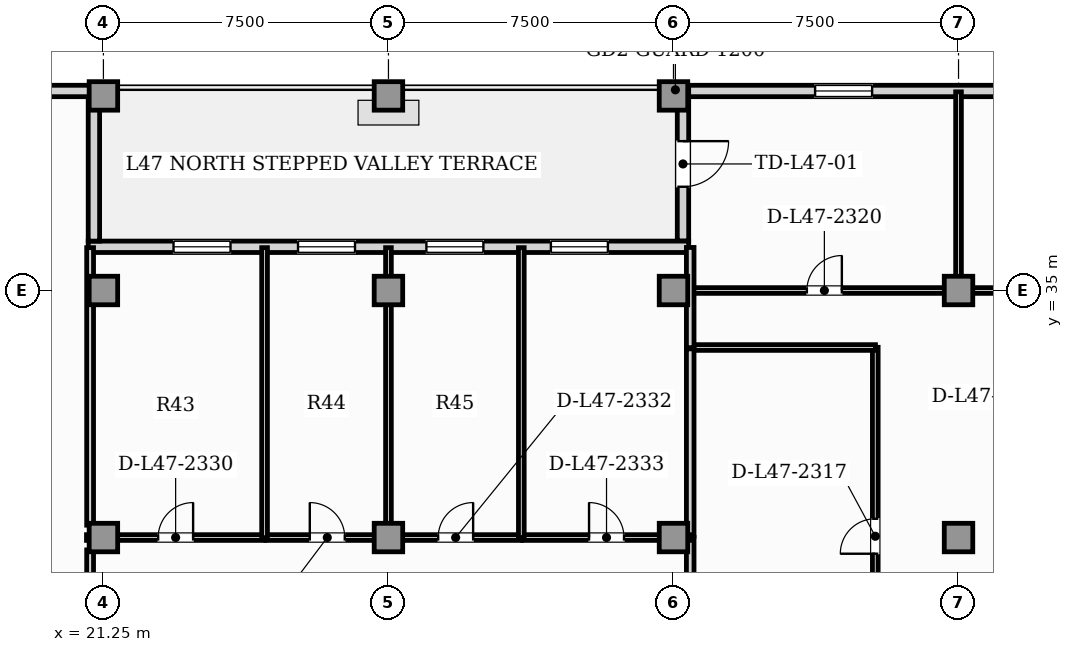
"""IFC4 building model, lengths in metres.
Left out: names, types, materials, properties, quantities, classifications, styles, units other than length and angle.
Written with IfcOpenShell. Run it as: python <this file> out.ifc"""

import sys

from ifc_helpers import new_model, si_unit, direction, frame, frame_2d, origin, origin_2d, place, context, subcontext, project, spatial, rectangle, extrude, element, fill, save


model = new_model("IFC4")
c1 = context("Model", 3, precision=1e-05, world=origin(), true_north=direction((0.0, 1.0)))
c2 = subcontext(c1, "Body", "Model", "MODEL_VIEW")
j1 = project(units=[si_unit("LENGTHUNIT", "METRE"), si_unit("PLANEANGLEUNIT", "RADIAN")], contexts=[c1])
p1 = place(None, origin())
s1 = spatial("IfcSite", under=j1, at=p1, CompositionType="ELEMENT")
p2 = place(p1, origin())
s2 = spatial("IfcBuilding", under=s1, at=p2, CompositionType="ELEMENT")
p3 = place(p2, frame((0.0, 0.0, 192.6)))
s3 = spatial("IfcBuildingStorey", under=s2, at=p3, CompositionType="ELEMENT", Elevation=192.6)
for number, where, z_axis, x_axis in (
    (1, (21.25, 28.5, 0.0), (0.0, 0.0, 1.0), (1.0, 0.0, 0.0)),
    (2, (28.75, 28.5, 0.0), (0.0, 0.0, 1.0), (1.0, 0.0, 0.0)),
    (3, (36.25, 28.5, 0.0), (0.0, 0.0, 1.0), (1.0, 0.0, 0.0)),
    (4, (43.75, 28.5, 0.0), (0.0, 0.0, 1.0), (1.0, 0.0, 0.0)),
    (5, (21.25, 40.12, 0.0), (0.0, 0.0, 1.0), (1.0, 0.0, 0.0)),
    (6, (28.75, 40.12, 0.0), (0.0, 0.0, 1.0), (1.0, 0.0, 0.0)),
    (7, (36.25, 40.12, 0.0), (0.0, 0.0, 1.0), (1.0, 0.0, 0.0)),
    (8, (21.25, 35.0, 0.0), (0.0, 0.0, 1.0), (1.0, 0.0, 0.0)),
    (9, (28.75, 35.0, 0.0), (0.0, 0.0, 1.0), (1.0, 0.0, 0.0)),
    (10, (36.25, 35.0, 0.0), (0.0, 0.0, 1.0), (1.0, 0.0, 0.0)),
    (11, (43.75, 35.0, 0.0), (0.0, 0.0, 1.0), (1.0, 0.0, 0.0)),
):
    element("IfcColumn", number, at=place(p3, frame(where, z_axis=z_axis, x_axis=x_axis)), inside=s3, PredefinedType="COLUMN", context=c2, shape_type="SweptSolid", body=[
        extrude(rectangle(XDim=0.75, YDim=0.75, at=origin_2d()), origin(), (0.0, 0.0, 1.0), 3.85),
    ])
p4 = place(p3, frame((49.06, 40.25, 0.0), z_axis=(0.0, 0.0, 1.0), x_axis=(-1.0, 0.0, 0.0)))
e12 = element("IfcWall", 12, at=p4, inside=s3, PredefinedType="SOLIDWALL", context=c2, shape_type="SweptSolid", body=[
    extrude(rectangle(XDim=12.67, YDim=0.3, at=frame_2d((6.335, 0.0))), origin(), (0.0, 0.0, 1.0), 3.63),
])
p5 = place(p4, frame((7.584, 0.0, 0.9)))
e13 = element("IfcOpeningElement", 13, at=p5, cuts=e12, PredefinedType="OPENING", context=c2, shape_type="SweptSolid", body=[
    extrude(rectangle(XDim=1.5, YDim=1.95, at=frame_2d((0.75, 0.975))), frame((0.0, 0.16, 0.0), z_axis=(0.0, -1.0, 0.0), x_axis=(1.0, 0.0, 0.0)), (0.0, 0.0, 1.0), 0.32),
])
p6 = place(p3, frame((36.5, 40.36, 0.0), z_axis=(0.0, 0.0, 1.0), x_axis=(0.0, -1.0, 0.0)))
e14 = element("IfcWall", 14, at=p6, inside=s3, PredefinedType="SOLIDWALL", context=c2, shape_type="SweptSolid", body=[
    extrude(rectangle(XDim=4.06, YDim=0.3, at=frame_2d((2.03, 0.0))), origin(), (0.0, 0.0, 1.0), 3.63),
])
p7 = place(p6, frame((1.43, 0.0, 0.0)))
e15 = element("IfcOpeningElement", 15, at=p7, cuts=e14, PredefinedType="OPENING", context=c2, shape_type="SweptSolid", body=[
    extrude(rectangle(XDim=1.2, YDim=2.2, at=frame_2d((0.6, 1.1))), frame((0.0, 0.16, 0.0), z_axis=(0.0, -1.0, 0.0), x_axis=(1.0, 0.0, 0.0)), (0.0, 0.0, 1.0), 0.32),
])
p8 = place(p3, frame((36.65, 36.15, 0.0), z_axis=(0.0, 0.0, 1.0), x_axis=(-1.0, 0.0, 0.0)))
e16 = element("IfcWall", 16, at=p8, inside=s3, PredefinedType="SOLIDWALL", context=c2, shape_type="SweptSolid", body=[
    extrude(rectangle(XDim=15.8, YDim=0.3, at=frame_2d((7.9, 0.0))), origin(), (0.0, 0.0, 1.0), 3.63),
])
p9 = place(p8, frame((12.055, 0.0, 0.9)))
e17 = element("IfcOpeningElement", 17, at=p9, cuts=e16, PredefinedType="OPENING", context=c2, shape_type="SweptSolid", body=[
    extrude(rectangle(XDim=1.5, YDim=1.95, at=frame_2d((0.75, 0.975))), frame((0.0, 0.16, 0.0), z_axis=(0.0, -1.0, 0.0), x_axis=(1.0, 0.0, 0.0)), (0.0, 0.0, 1.0), 0.32),
])
p10 = place(p8, frame((8.78, 0.0, 0.9)))
e18 = element("IfcOpeningElement", 18, at=p10, cuts=e16, PredefinedType="OPENING", context=c2, shape_type="SweptSolid", body=[
    extrude(rectangle(XDim=1.5, YDim=1.95, at=frame_2d((0.75, 0.975))), frame((0.0, 0.16, 0.0), z_axis=(0.0, -1.0, 0.0), x_axis=(1.0, 0.0, 0.0)), (0.0, 0.0, 1.0), 0.32),
])
p11 = place(p8, frame((5.402, 0.0, 0.9)))
e19 = element("IfcOpeningElement", 19, at=p11, cuts=e16, PredefinedType="OPENING", context=c2, shape_type="SweptSolid", body=[
    extrude(rectangle(XDim=1.5, YDim=1.95, at=frame_2d((0.75, 0.975))), frame((0.0, 0.16, 0.0), z_axis=(0.0, -1.0, 0.0), x_axis=(1.0, 0.0, 0.0)), (0.0, 0.0, 1.0), 0.32),
])
p12 = place(p8, frame((2.126, 0.0, 0.9)))
e20 = element("IfcOpeningElement", 20, at=p12, cuts=e16, PredefinedType="OPENING", context=c2, shape_type="SweptSolid", body=[
    extrude(rectangle(XDim=1.5, YDim=1.95, at=frame_2d((0.75, 0.975))), frame((0.0, 0.16, 0.0), z_axis=(0.0, -1.0, 0.0), x_axis=(1.0, 0.0, 0.0)), (0.0, 0.0, 1.0), 0.32),
])
p13 = place(p3, frame((21.0, 36.3, 0.0), z_axis=(0.0, 0.0, 1.0), x_axis=(0.0, 1.0, 0.0)))
e21 = element("IfcWall", 21, at=p13, inside=s3, PredefinedType="SOLIDWALL", context=c2, shape_type="SweptSolid", body=[
    extrude(rectangle(XDim=4.06, YDim=0.3, at=frame_2d((2.03, 0.0))), origin(), (0.0, 0.0, 1.0), 3.63),
])
p14 = place(p3, frame((21.11, 40.25, 0.0), z_axis=(0.0, 0.0, 1.0), x_axis=(-1.0, 0.0, 0.0)))
e22 = element("IfcWall", 22, at=p14, inside=s3, PredefinedType="SOLIDWALL", context=c2, shape_type="SweptSolid", body=[
    extrude(rectangle(XDim=12.67, YDim=0.3, at=frame_2d((6.335, 0.0))), origin(), (0.0, 0.0, 1.0), 3.63),
])
p15 = place(p14, frame((10.4, 0.0, 0.9)))
e23 = element("IfcOpeningElement", 23, at=p15, cuts=e22, PredefinedType="OPENING", context=c2, shape_type="SweptSolid", body=[
    extrude(rectangle(XDim=1.5, YDim=1.95, at=frame_2d((0.75, 0.975))), frame((0.0, 0.16, 0.0), z_axis=(0.0, -1.0, 0.0), x_axis=(1.0, 0.0, 0.0)), (0.0, 0.0, 1.0), 0.32),
])
p16 = place(p14, frame((7.186, 0.0, 0.9)))
e24 = element("IfcOpeningElement", 24, at=p16, cuts=e22, PredefinedType="OPENING", context=c2, shape_type="SweptSolid", body=[
    extrude(rectangle(XDim=1.5, YDim=1.95, at=frame_2d((0.75, 0.975))), frame((0.0, 0.16, 0.0), z_axis=(0.0, -1.0, 0.0), x_axis=(1.0, 0.0, 0.0)), (0.0, 0.0, 1.0), 0.32),
])
p17 = place(p3, frame((41.56, 23.563, 0.0), z_axis=(0.0, 0.0, 1.0), x_axis=(0.0, 1.0, 0.0)))
e25 = element("IfcWall", 25, at=p17, inside=s3, PredefinedType="PARTITIONING", context=c2, shape_type="SweptSolid", body=[
    extrude(rectangle(XDim=9.942, YDim=0.15, at=frame_2d((4.971, 0.0))), origin(), (0.0, 0.0, 1.0), 3.63),
])
p18 = place(p17, frame((4.511, 0.0, 0.0)))
e26 = element("IfcOpeningElement", 26, at=p18, cuts=e25, PredefinedType="OPENING", context=c2, shape_type="SweptSolid", body=[
    extrude(rectangle(XDim=0.92, YDim=2.1, at=frame_2d((0.46, 1.05))), frame((0.0, 0.085, 0.0), z_axis=(0.0, -1.0, 0.0), x_axis=(1.0, 0.0, 0.0)), (0.0, 0.0, 1.0), 0.17),
])
p19 = place(p3, frame((36.685, 33.5, 0.0), z_axis=(0.0, 0.0, 1.0), x_axis=(1.0, 0.0, 0.0)))
e27 = element("IfcWall", 27, at=p19, inside=s3, PredefinedType="PARTITIONING", context=c2, shape_type="SweptSolid", body=[
    extrude(rectangle(XDim=4.88, YDim=0.15, at=frame_2d((2.44, 0.0))), origin(), (0.0, 0.0, 1.0), 3.63),
])
p20 = place(p3, frame((36.685, 35.0, 0.0), z_axis=(0.0, 0.0, 1.0), x_axis=(1.0, 0.0, 0.0)))
e28 = element("IfcWall", 28, at=p20, inside=s3, PredefinedType="PARTITIONING", context=c2, shape_type="SweptSolid", body=[
    extrude(rectangle(XDim=7.07, YDim=0.15, at=frame_2d((3.535, 0.0))), origin(), (0.0, 0.0, 1.0), 3.085),
])
p21 = place(p20, frame((3.075, 0.0, 0.0)))
e29 = element("IfcOpeningElement", 29, at=p21, cuts=e28, PredefinedType="OPENING", context=c2, shape_type="SweptSolid", body=[
    extrude(rectangle(XDim=0.92, YDim=2.1, at=frame_2d((0.46, 1.05))), frame((0.0, 0.085, 0.0), z_axis=(0.0, -1.0, 0.0), x_axis=(1.0, 0.0, 0.0)), (0.0, 0.0, 1.0), 0.17),
])
p22 = place(p3, frame((43.785, 35.0, 0.0), z_axis=(0.0, 0.0, 1.0), x_axis=(1.0, 0.0, 0.0)))
e30 = element("IfcWall", 30, at=p22, inside=s3, PredefinedType="PARTITIONING", context=c2, shape_type="SweptSolid", body=[
    extrude(rectangle(XDim=8.343, YDim=0.15, at=frame_2d((4.171, 0.0))), origin(), (0.0, 0.0, 1.0), 3.085),
])
p23 = place(p22, frame((3.711, 0.0, 0.0)))
e31 = element("IfcOpeningElement", 31, at=p23, cuts=e30, PredefinedType="OPENING", context=c2, shape_type="SweptSolid", body=[
    extrude(rectangle(XDim=0.92, YDim=2.1, at=frame_2d((0.46, 1.05))), frame((0.0, 0.085, 0.0), z_axis=(0.0, -1.0, 0.0), x_axis=(1.0, 0.0, 0.0)), (0.0, 0.0, 1.0), 0.17),
])
p24 = place(p3, frame((36.69, 33.495, 0.0), z_axis=(0.0, 0.0, 1.0), x_axis=(0.0, 1.0, 0.0)))
e32 = element("IfcWall", 32, at=p24, inside=s3, PredefinedType="PARTITIONING", context=c2, shape_type="SweptSolid", body=[
    extrude(rectangle(XDim=2.638, YDim=0.2, at=frame_2d((1.319, 0.0))), origin(), (0.0, 0.0, 1.0), 3.63),
])
p25 = place(p3, frame((36.69, 26.995, 0.0), z_axis=(0.0, 0.0, 1.0), x_axis=(0.0, 1.0, 0.0)))
e33 = element("IfcWall", 33, at=p25, inside=s3, PredefinedType="PARTITIONING", context=c2, shape_type="SweptSolid", body=[
    extrude(rectangle(XDim=1.51, YDim=0.2, at=frame_2d((0.755, 0.0))), origin(), (0.0, 0.0, 1.0), 3.63),
])
p26 = place(p3, frame((36.69, 28.535, 0.0), z_axis=(0.0, 0.0, 1.0), x_axis=(0.0, 1.0, 0.0)))
e34 = element("IfcWall", 34, at=p26, inside=s3, PredefinedType="PARTITIONING", context=c2, shape_type="SweptSolid", body=[
    extrude(rectangle(XDim=4.93, YDim=0.2, at=frame_2d((2.465, 0.0))), origin(), (0.0, 0.0, 1.0), 3.63),
])
p27 = place(p3, frame((43.75, 34.995, 0.0), z_axis=(0.0, 0.0, 1.0), x_axis=(0.0, 1.0, 0.0)))
e35 = element("IfcWall", 35, at=p27, inside=s3, PredefinedType="PARTITIONING", context=c2, shape_type="SweptSolid", body=[
    extrude(rectangle(XDim=5.232, YDim=0.15, at=frame_2d((2.616, 0.0))), origin(), (0.0, 0.0, 1.0), 3.63),
])
p28 = place(p3, frame((20.805, 28.5, 0.0), z_axis=(0.0, 0.0, 1.0), x_axis=(1.0, 0.0, 0.0)))
e36 = element("IfcWall", 36, at=p28, inside=s3, PredefinedType="PARTITIONING", context=c2, shape_type="SweptSolid", body=[
    extrude(rectangle(XDim=4.691, YDim=0.15, at=frame_2d((2.345, 0.0))), origin(), (0.0, 0.0, 1.0), 3.63),
])
p29 = place(p28, frame((1.885, 0.0, 0.0)))
e37 = element("IfcOpeningElement", 37, at=p29, cuts=e36, PredefinedType="OPENING", context=c2, shape_type="SweptSolid", body=[
    extrude(rectangle(XDim=0.92, YDim=2.1, at=frame_2d((0.46, 1.05))), frame((0.0, 0.085, 0.0), z_axis=(0.0, -1.0, 0.0), x_axis=(1.0, 0.0, 0.0)), (0.0, 0.0, 1.0), 0.17),
])
p30 = place(p3, frame((25.526, 28.5, 0.0), z_axis=(0.0, 0.0, 1.0), x_axis=(1.0, 0.0, 0.0)))
e38 = element("IfcWall", 38, at=p30, inside=s3, PredefinedType="PARTITIONING", context=c2, shape_type="SweptSolid", body=[
    extrude(rectangle(XDim=3.229, YDim=0.15, at=frame_2d((1.615, 0.0))), origin(), (0.0, 0.0, 1.0), 3.63),
])
p31 = place(p30, frame((1.155, 0.0, 0.0)))
e39 = element("IfcOpeningElement", 39, at=p31, cuts=e38, PredefinedType="OPENING", context=c2, shape_type="SweptSolid", body=[
    extrude(rectangle(XDim=0.92, YDim=2.1, at=frame_2d((0.46, 1.05))), frame((0.0, 0.085, 0.0), z_axis=(0.0, -1.0, 0.0), x_axis=(1.0, 0.0, 0.0)), (0.0, 0.0, 1.0), 0.17),
])
p32 = place(p3, frame((28.785, 28.5, 0.0), z_axis=(0.0, 0.0, 1.0), x_axis=(1.0, 0.0, 0.0)))
e40 = element("IfcWall", 40, at=p32, inside=s3, PredefinedType="PARTITIONING", context=c2, shape_type="SweptSolid", body=[
    extrude(rectangle(XDim=3.466, YDim=0.15, at=frame_2d((1.733, 0.0))), origin(), (0.0, 0.0, 1.0), 3.63),
])
p33 = place(p32, frame((1.273, 0.0, 0.0)))
e41 = element("IfcOpeningElement", 41, at=p33, cuts=e40, PredefinedType="OPENING", context=c2, shape_type="SweptSolid", body=[
    extrude(rectangle(XDim=0.92, YDim=2.1, at=frame_2d((0.46, 1.05))), frame((0.0, 0.085, 0.0), z_axis=(0.0, -1.0, 0.0), x_axis=(1.0, 0.0, 0.0)), (0.0, 0.0, 1.0), 0.17),
])
p34 = place(p3, frame((32.281, 28.5, 0.0), z_axis=(0.0, 0.0, 1.0), x_axis=(1.0, 0.0, 0.0)))
e42 = element("IfcWall", 42, at=p34, inside=s3, PredefinedType="PARTITIONING", context=c2, shape_type="SweptSolid", body=[
    extrude(rectangle(XDim=4.414, YDim=0.15, at=frame_2d((2.207, 0.0))), origin(), (0.0, 0.0, 1.0), 3.63),
])
p35 = place(p34, frame((1.747, 0.0, 0.0)))
e43 = element("IfcOpeningElement", 43, at=p35, cuts=e42, PredefinedType="OPENING", context=c2, shape_type="SweptSolid", body=[
    extrude(rectangle(XDim=0.92, YDim=2.1, at=frame_2d((0.46, 1.05))), frame((0.0, 0.085, 0.0), z_axis=(0.0, -1.0, 0.0), x_axis=(1.0, 0.0, 0.0)), (0.0, 0.0, 1.0), 0.17),
])
p36 = place(p3, frame((25.49, 28.495, 0.0), z_axis=(0.0, 0.0, 1.0), x_axis=(0.0, 1.0, 0.0)))
e44 = element("IfcWall", 44, at=p36, inside=s3, PredefinedType="PARTITIONING", context=c2, shape_type="SweptSolid", body=[
    extrude(rectangle(XDim=7.632, YDim=0.15, at=frame_2d((3.816, 0.0))), origin(), (0.0, 0.0, 1.0), 3.63),
])
p37 = place(p3, frame((28.75, 28.495, 0.0), z_axis=(0.0, 0.0, 1.0), x_axis=(0.0, 1.0, 0.0)))
e45 = element("IfcWall", 45, at=p37, inside=s3, PredefinedType="PARTITIONING", context=c2, shape_type="SweptSolid", body=[
    extrude(rectangle(XDim=7.632, YDim=0.15, at=frame_2d((3.816, 0.0))), origin(), (0.0, 0.0, 1.0), 3.223),
])
p38 = place(p3, frame((32.246, 28.495, 0.0), z_axis=(0.0, 0.0, 1.0), x_axis=(0.0, 1.0, 0.0)))
e46 = element("IfcWall", 46, at=p38, inside=s3, PredefinedType="PARTITIONING", context=c2, shape_type="SweptSolid", body=[
    extrude(rectangle(XDim=7.632, YDim=0.15, at=frame_2d((3.816, 0.0))), origin(), (0.0, 0.0, 1.0), 3.63),
])
p39 = place(p3, frame((20.9, 27.325, 0.0), z_axis=(0.0, 0.0, 1.0), x_axis=(0.0, 1.0, 0.0)))
e47 = element("IfcWall", 47, at=p39, inside=s3, PredefinedType="PARTITIONING", context=c2, shape_type="SweptSolid", body=[
    extrude(rectangle(XDim=0.85, YDim=0.18, at=frame_2d((0.425, 0.0))), origin(), (0.0, 0.0, 1.0), 3.63),
])
p40 = place(p3, frame((20.9, 28.825, 0.0), z_axis=(0.0, 0.0, 1.0), x_axis=(0.0, 1.0, 0.0)))
e48 = element("IfcWall", 48, at=p40, inside=s3, PredefinedType="PARTITIONING", context=c2, shape_type="SweptSolid", body=[
    extrude(rectangle(XDim=7.302, YDim=0.18, at=frame_2d((3.651, 0.0))), origin(), (0.0, 0.0, 1.0), 3.63),
])
p41 = place(p7, frame((1.2, 0.0, 0.0), z_axis=(0.0, 0.0, 1.0), x_axis=(-1.0, 0.0, 0.0)))
e49 = element("IfcDoor", 49, at=p41, inside=s3, OperationType="SINGLE_SWING_RIGHT", PredefinedType="DOOR", context=c2, shape_type="SweptSolid", body=[
    extrude(rectangle(XDim=1.2, YDim=2.2, at=frame_2d((0.6, 1.1))), frame((0.0, 0.025, 0.0), z_axis=(0.0, -1.0, 0.0), x_axis=(1.0, 0.0, 0.0)), (0.0, 0.0, 1.0), 0.05),
])
fill(e15, e49)
p42 = place(p5, origin())
e50 = element("IfcWindow", 50, at=p42, inside=s3, PartitioningType="SINGLE_PANEL", PredefinedType="WINDOW", context=c2, shape_type="SweptSolid", body=[
    extrude(rectangle(XDim=1.5, YDim=1.95, at=frame_2d((0.75, 0.975))), frame((0.0, 0.03, 0.0), z_axis=(0.0, -1.0, 0.0), x_axis=(1.0, 0.0, 0.0)), (0.0, 0.0, 1.0), 0.06),
])
fill(e13, e50)
p43 = place(p9, origin())
e51 = element("IfcWindow", 51, at=p43, inside=s3, PartitioningType="SINGLE_PANEL", PredefinedType="WINDOW", context=c2, shape_type="SweptSolid", body=[
    extrude(rectangle(XDim=1.5, YDim=1.95, at=frame_2d((0.75, 0.975))), frame((0.0, 0.03, 0.0), z_axis=(0.0, -1.0, 0.0), x_axis=(1.0, 0.0, 0.0)), (0.0, 0.0, 1.0), 0.06),
])
fill(e17, e51)
p44 = place(p10, origin())
e52 = element("IfcWindow", 52, at=p44, inside=s3, PartitioningType="SINGLE_PANEL", PredefinedType="WINDOW", context=c2, shape_type="SweptSolid", body=[
    extrude(rectangle(XDim=1.5, YDim=1.95, at=frame_2d((0.75, 0.975))), frame((0.0, 0.03, 0.0), z_axis=(0.0, -1.0, 0.0), x_axis=(1.0, 0.0, 0.0)), (0.0, 0.0, 1.0), 0.06),
])
fill(e18, e52)
p45 = place(p11, origin())
e53 = element("IfcWindow", 53, at=p45, inside=s3, PartitioningType="SINGLE_PANEL", PredefinedType="WINDOW", context=c2, shape_type="SweptSolid", body=[
    extrude(rectangle(XDim=1.5, YDim=1.95, at=frame_2d((0.75, 0.975))), frame((0.0, 0.03, 0.0), z_axis=(0.0, -1.0, 0.0), x_axis=(1.0, 0.0, 0.0)), (0.0, 0.0, 1.0), 0.06),
])
fill(e19, e53)
p46 = place(p12, origin())
e54 = element("IfcWindow", 54, at=p46, inside=s3, PartitioningType="SINGLE_PANEL", PredefinedType="WINDOW", context=c2, shape_type="SweptSolid", body=[
    extrude(rectangle(XDim=1.5, YDim=1.95, at=frame_2d((0.75, 0.975))), frame((0.0, 0.03, 0.0), z_axis=(0.0, -1.0, 0.0), x_axis=(1.0, 0.0, 0.0)), (0.0, 0.0, 1.0), 0.06),
])
fill(e20, e54)
p47 = place(p18, origin())
e55 = element("IfcDoor", 55, at=p47, inside=s3, OperationType="SINGLE_SWING_LEFT", PredefinedType="DOOR", context=c2, shape_type="SweptSolid", body=[
    extrude(rectangle(XDim=0.92, YDim=2.1, at=frame_2d((0.46, 1.05))), frame((0.0, 0.025, 0.0), z_axis=(0.0, -1.0, 0.0), x_axis=(1.0, 0.0, 0.0)), (0.0, 0.0, 1.0), 0.05),
])
fill(e26, e55)
p48 = place(p21, origin())
e56 = element("IfcDoor", 56, at=p48, inside=s3, OperationType="SINGLE_SWING_RIGHT", PredefinedType="DOOR", context=c2, shape_type="SweptSolid", body=[
    extrude(rectangle(XDim=0.92, YDim=2.1, at=frame_2d((0.46, 1.05))), frame((0.0, 0.025, 0.0), z_axis=(0.0, -1.0, 0.0), x_axis=(1.0, 0.0, 0.0)), (0.0, 0.0, 1.0), 0.05),
])
fill(e29, e56)
p49 = place(p29, origin())
e57 = element("IfcDoor", 57, at=p49, inside=s3, OperationType="SINGLE_SWING_RIGHT", PredefinedType="DOOR", context=c2, shape_type="SweptSolid", body=[
    extrude(rectangle(XDim=0.92, YDim=2.1, at=frame_2d((0.46, 1.05))), frame((0.0, 0.025, 0.0), z_axis=(0.0, -1.0, 0.0), x_axis=(1.0, 0.0, 0.0)), (0.0, 0.0, 1.0), 0.05),
])
fill(e37, e57)
p50 = place(p31, origin())
e58 = element("IfcDoor", 58, at=p50, inside=s3, OperationType="SINGLE_SWING_LEFT", PredefinedType="DOOR", context=c2, shape_type="SweptSolid", body=[
    extrude(rectangle(XDim=0.92, YDim=2.1, at=frame_2d((0.46, 1.05))), frame((0.0, 0.025, 0.0), z_axis=(0.0, -1.0, 0.0), x_axis=(1.0, 0.0, 0.0)), (0.0, 0.0, 1.0), 0.05),
])
fill(e39, e58)
p51 = place(p33, origin())
e59 = element("IfcDoor", 59, at=p51, inside=s3, OperationType="SINGLE_SWING_RIGHT", PredefinedType="DOOR", context=c2, shape_type="SweptSolid", body=[
    extrude(rectangle(XDim=0.92, YDim=2.1, at=frame_2d((0.46, 1.05))), frame((0.0, 0.025, 0.0), z_axis=(0.0, -1.0, 0.0), x_axis=(1.0, 0.0, 0.0)), (0.0, 0.0, 1.0), 0.05),
])
fill(e41, e59)
p52 = place(p35, origin())
e60 = element("IfcDoor", 60, at=p52, inside=s3, OperationType="SINGLE_SWING_LEFT", PredefinedType="DOOR", context=c2, shape_type="SweptSolid", body=[
    extrude(rectangle(XDim=0.92, YDim=2.1, at=frame_2d((0.46, 1.05))), frame((0.0, 0.025, 0.0), z_axis=(0.0, -1.0, 0.0), x_axis=(1.0, 0.0, 0.0)), (0.0, 0.0, 1.0), 0.05),
])
fill(e43, e60)
save(model, sys.argv[1])
